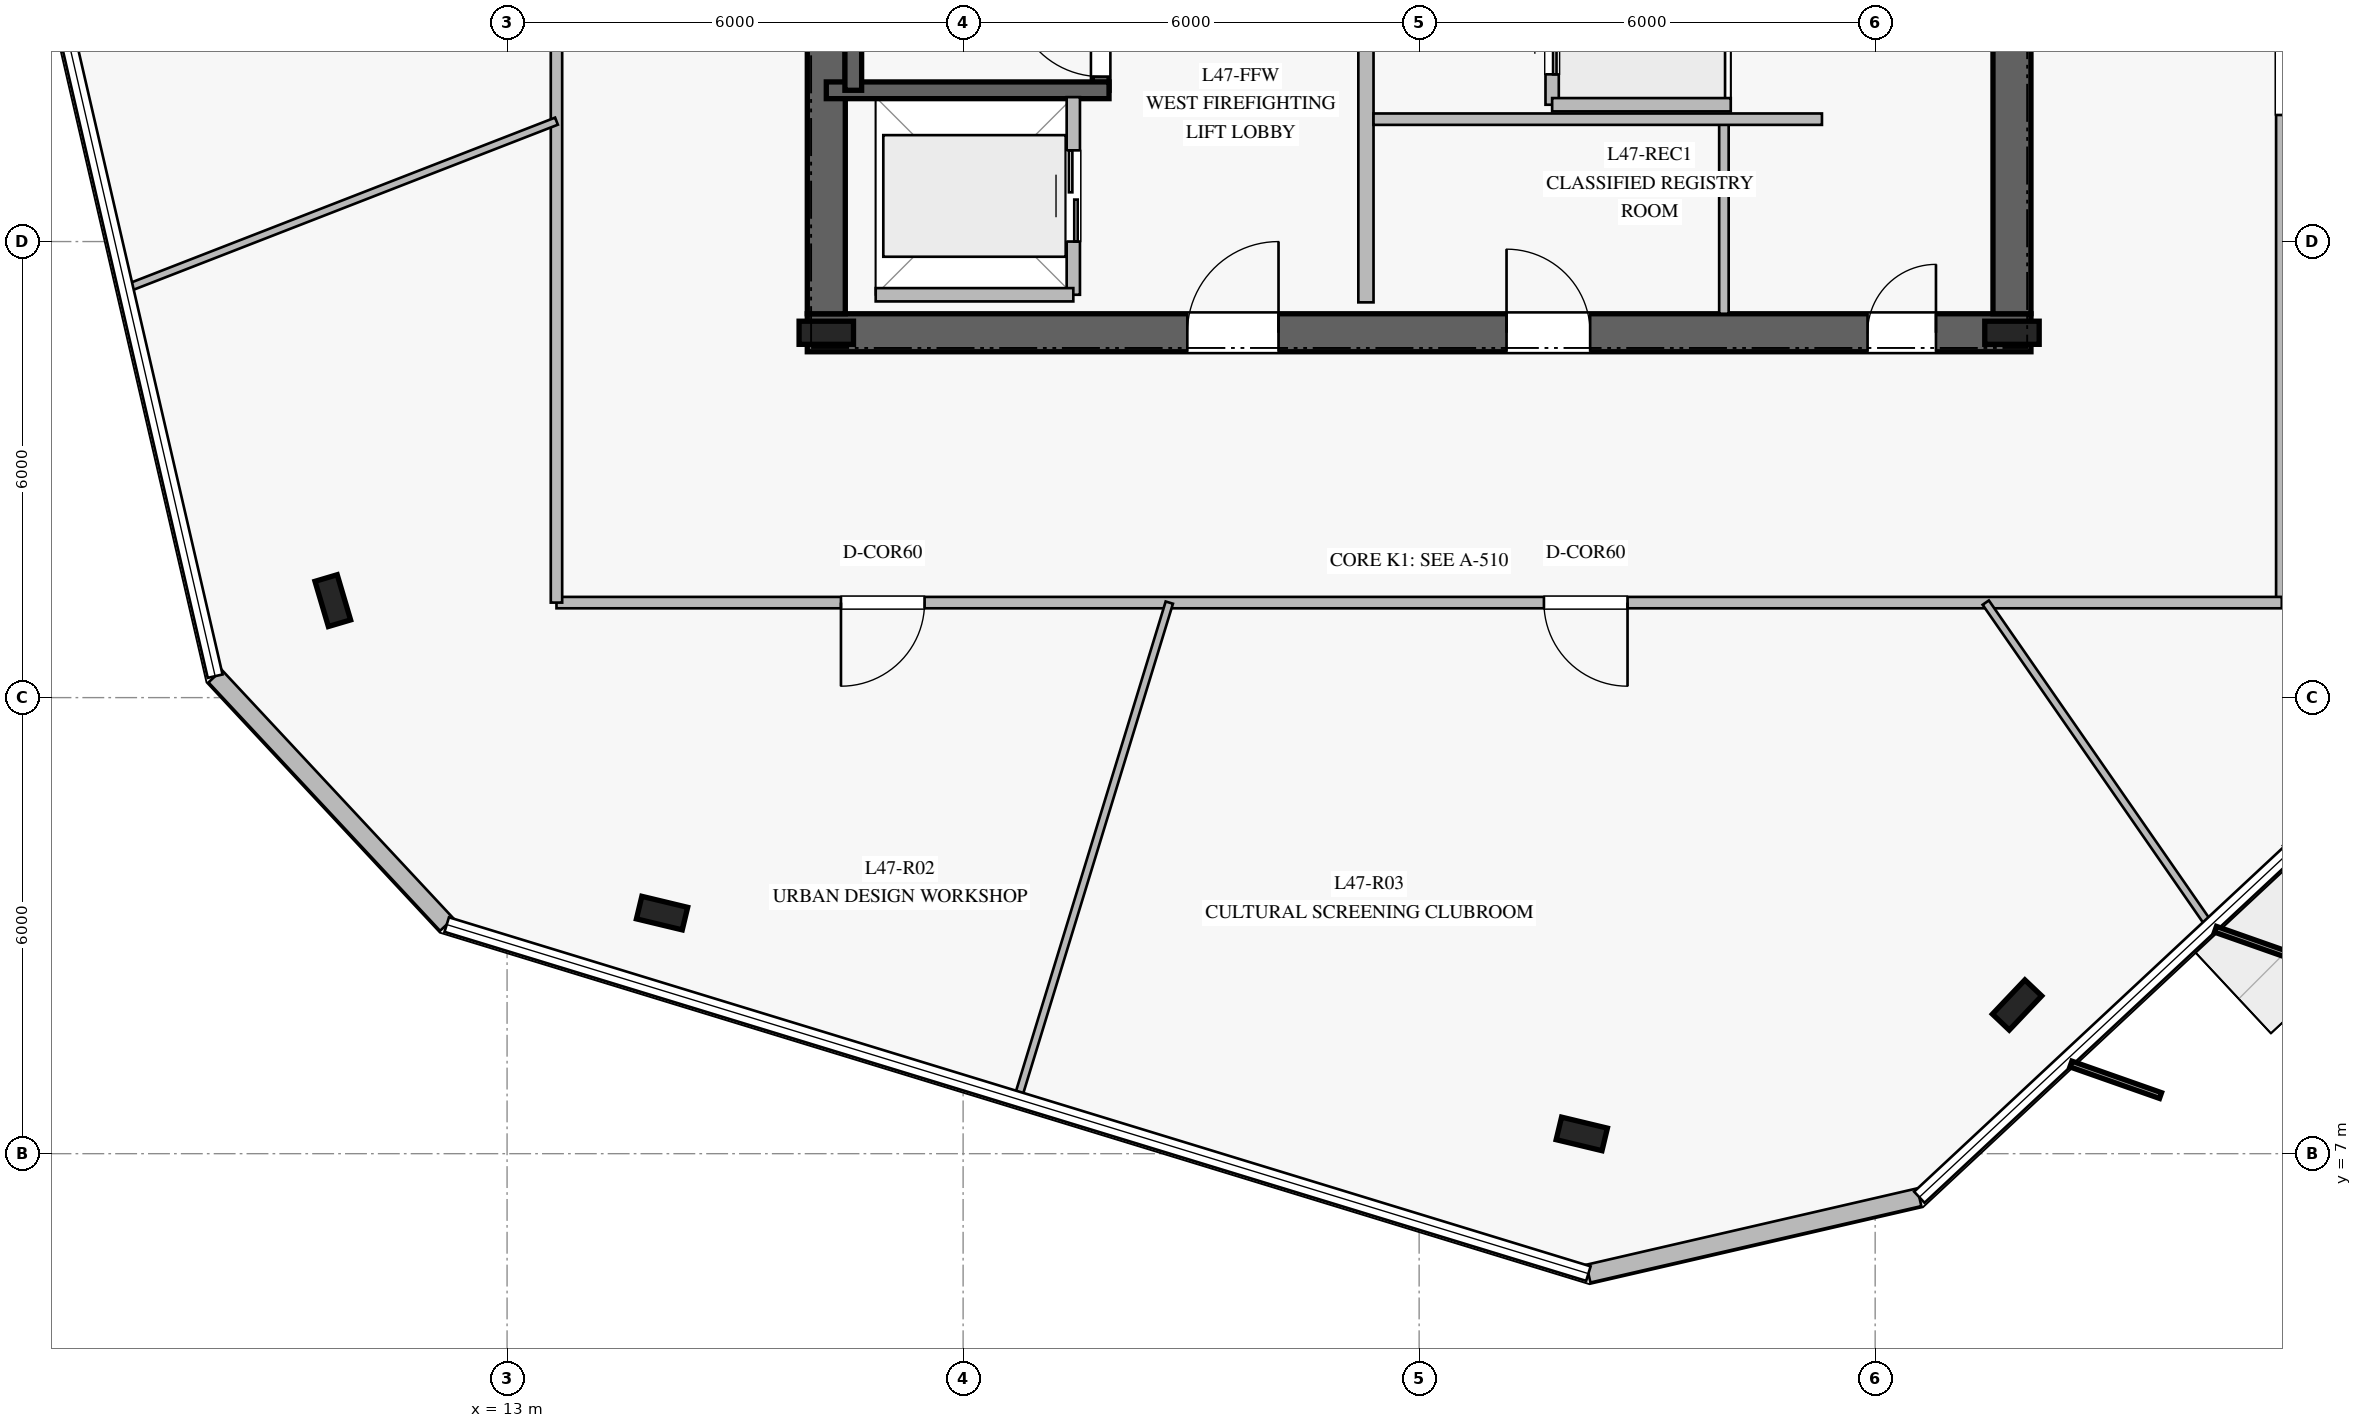
"""IFC4 building model, lengths in metres.
Left out: names, types, materials, properties, quantities, classifications, styles, units other than length and angle.
Written with IfcOpenShell. Run it as: python <this file> out.ifc"""

import sys

from ifc_helpers import new_model, si_unit, direction, frame, frame_2d, origin, origin_2d, place, context, subcontext, project, spatial, rectangle, i_section, extrude, element, fill, save


model = new_model("IFC4")
c1 = context("Model", 3, precision=1e-05, world=origin(), true_north=direction((0.0, 1.0)))
c2 = subcontext(c1, "Body", "Model", "MODEL_VIEW")
j1 = project(units=[si_unit("LENGTHUNIT", "METRE"), si_unit("PLANEANGLEUNIT", "RADIAN")], contexts=[c1])
p1 = place(None, origin())
s1 = spatial("IfcSite", under=j1, at=p1, CompositionType="ELEMENT")
p2 = place(p1, origin())
s2 = spatial("IfcBuilding", under=s1, at=p2, CompositionType="ELEMENT")
p3 = place(p2, frame((0.0, 0.0, 196.8)))
s3 = spatial("IfcBuildingStorey", under=s2, at=p3, CompositionType="ELEMENT", Elevation=196.8)
p4 = place(p3, frame((16.95, 17.8, 0.0), z_axis=(0.0, 0.0, 1.0), x_axis=(1.0, 0.0, 0.0)))
e1 = element("IfcWall", 1, at=p4, inside=s3, PredefinedType="SHEAR", context=c2, shape_type="SweptSolid", body=[
    extrude(rectangle(XDim=16.1, YDim=0.5, at=frame_2d((8.05, 0.0))), origin(), (0.0, 0.0, 1.0), 3.78),
])
p5 = place(p4, frame((5.0, 0.0, 0.0)))
e2 = element("IfcOpeningElement", 2, at=p5, cuts=e1, PredefinedType="OPENING", context=c2, shape_type="SweptSolid", body=[
    extrude(rectangle(XDim=1.2, YDim=2.25, at=frame_2d((0.6, 1.125))), frame((0.0, 0.26, 0.0), z_axis=(0.0, -1.0, 0.0), x_axis=(1.0, 0.0, 0.0)), (0.0, 0.0, 1.0), 0.52),
])
p6 = place(p4, frame((13.95, 0.0, 0.0)))
e3 = element("IfcOpeningElement", 3, at=p6, cuts=e1, PredefinedType="OPENING", context=c2, shape_type="SweptSolid", body=[
    extrude(rectangle(XDim=0.9, YDim=2.1, at=frame_2d((0.45, 1.05))), frame((0.0, 0.26, 0.0), z_axis=(0.0, -1.0, 0.0), x_axis=(1.0, 0.0, 0.0)), (0.0, 0.0, 1.0), 0.52),
])
p7 = place(p4, frame((9.2, 0.0, 0.0)))
e4 = element("IfcOpeningElement", 4, at=p7, cuts=e1, PredefinedType="OPENING", context=c2, shape_type="SweptSolid", body=[
    extrude(rectangle(XDim=1.1, YDim=2.2, at=frame_2d((0.55, 1.1))), frame((0.0, 0.26, 0.0), z_axis=(0.0, -1.0, 0.0), x_axis=(1.0, 0.0, 0.0)), (0.0, 0.0, 1.0), 0.52),
])
p8 = place(p3, frame((17.2, 31.95, 0.0), z_axis=(0.0, 0.0, 1.0), x_axis=(0.0, -1.0, 0.0)))
e5 = element("IfcWall", 5, at=p8, inside=s3, PredefinedType="SHEAR", context=c2, shape_type="SweptSolid", body=[
    extrude(rectangle(XDim=13.9, YDim=0.5, at=frame_2d((6.95, 0.0))), origin(), (0.0, 0.0, 1.0), 3.78),
])
p9 = place(p8, frame((2.1, 0.0, 0.0)))
e6 = element("IfcOpeningElement", 6, at=p9, cuts=e5, PredefinedType="OPENING", context=c2, shape_type="SweptSolid", body=[
    extrude(rectangle(XDim=1.5, YDim=2.2, at=frame_2d((0.75, 1.1))), frame((0.0, 0.26, 0.0), z_axis=(0.0, -1.0, 0.0), x_axis=(1.0, 0.0, 0.0)), (0.0, 0.0, 1.0), 0.52),
])
p10 = place(p3, frame((32.8, 18.05, 0.0), z_axis=(0.0, 0.0, 1.0), x_axis=(0.0, 1.0, 0.0)))
e7 = element("IfcWall", 7, at=p10, inside=s3, PredefinedType="SHEAR", context=c2, shape_type="SweptSolid", body=[
    extrude(rectangle(XDim=13.9, YDim=0.5, at=frame_2d((6.95, 0.0))), origin(), (0.0, 0.0, 1.0), 3.78),
])
for number, where, z_axis, x_axis in (
    (8, (17.2, 17.8, 0.0), (0.0, 0.0, 1.0), (1.0, 0.0, 0.0)),
    (9, (32.8, 17.8, 0.0), (0.0, 0.0, 1.0), (1.0, 0.0, 0.0)),
):
    element("IfcColumn", number, at=place(p3, frame(where, z_axis=z_axis, x_axis=x_axis)), inside=s3, PredefinedType="COLUMN", context=c2, shape_type="SweptSolid", body=[
        extrude(i_section(OverallWidth=0.304, OverallDepth=0.716, WebThickness=0.021, FlangeThickness=0.04, at=origin_2d()), origin(), (0.0, 0.0, 1.0), 4.0),
    ])
p11 = place(p3, frame((20.81, 20.99, 0.0), z_axis=(0.0, 0.0, 1.0), x_axis=(0.0, 1.0, 0.0)))
e10 = element("IfcWall", 10, at=p11, inside=s3, PredefinedType="SOLIDWALL", context=c2, shape_type="SweptSolid", body=[
    extrude(rectangle(XDim=7.22, YDim=0.22, at=frame_2d((3.61, 0.0))), origin(), (0.0, 0.0, 1.0), 3.78),
])
p12 = place(p11, frame((0.18, 0.0, 0.0)))
e11 = element("IfcOpeningElement", 11, at=p12, cuts=e10, PredefinedType="OPENING", context=c2, shape_type="SweptSolid", body=[
    extrude(rectangle(XDim=1.15, YDim=2.2, at=frame_2d((0.575, 1.1))), frame((0.0, 0.12, 0.0), z_axis=(0.0, -1.0, 0.0), x_axis=(1.0, 0.0, 0.0)), (0.0, 0.0, 1.0), 0.24),
])
p13 = place(p3, frame((17.2, 20.99, 0.0), z_axis=(0.0, 0.0, 1.0), x_axis=(1.0, 0.0, 0.0)))
e12 = element("IfcWall", 12, at=p13, inside=s3, PredefinedType="SOLIDWALL", context=c2, shape_type="SweptSolid", body=[
    extrude(rectangle(XDim=3.72, YDim=0.22, at=frame_2d((1.86, 0.0))), origin(), (0.0, 0.0, 1.0), 3.78),
])
p14 = place(p3, frame((17.555, 28.21, 0.0), z_axis=(0.0, 0.0, 1.0), x_axis=(0.0, -1.0, 0.0)))
e13 = element("IfcWall", 13, at=p14, inside=s3, PredefinedType="SOLIDWALL", context=c2, shape_type="SweptSolid", body=[
    extrude(rectangle(XDim=7.22, YDim=0.22, at=frame_2d((3.61, 0.0))), origin(), (0.0, 0.0, 1.0), 3.78),
])
for number, where, z_axis, x_axis in (
    (14, (10.707, 14.276, 0.0), (0.0, 0.0, 1.0), (-0.284, 0.959, 0.0)),
    (15, (15.039, 10.165, 0.0), (0.0, 0.0, 1.0), (-0.972, 0.233, 0.0)),
    (16, (27.14, 7.26, 0.0), (0.0, 0.0, 1.0), (-0.972, 0.233, 0.0)),
    (17, (32.867, 8.956, 0.0), (0.0, 0.0, 1.0), (0.688, 0.725, 0.0)),
):
    element("IfcColumn", number, at=place(p3, frame(where, z_axis=z_axis, x_axis=x_axis)), inside=s3, PredefinedType="COLUMN", context=c2, shape_type="SweptSolid", body=[
        extrude(i_section(OverallWidth=0.305, OverallDepth=0.62, WebThickness=0.021, FlangeThickness=0.04, at=origin_2d()), origin(), (0.0, 0.0, 1.0), 4.0),
    ])
p15 = place(p3, frame((9.159, 13.282, 0.0), z_axis=(0.0, 0.0, 1.0), x_axis=(0.681950226265, -0.73139858415, 0.0)))
e18 = element("IfcWall", 18, at=p15, inside=s3, PredefinedType="STANDARD", context=c2, shape_type="SweptSolid", body=[
    extrude(rectangle(XDim=4.468, YDim=0.24, at=frame_2d((2.234, 0.0))), origin(), (0.0, 0.0, 1.0), 3.78),
])
p16 = place(p3, frame((27.227, 5.422, 0.0), z_axis=(0.0, 0.0, 1.0), x_axis=(0.974385670371, 0.224883448427, 0.0)))
e19 = element("IfcWall", 19, at=p16, inside=s3, PredefinedType="STANDARD", context=c2, shape_type="SweptSolid", body=[
    extrude(rectangle(XDim=4.469, YDim=0.24, at=frame_2d((2.234, 0.0))), origin(), (0.0, 0.0, 1.0), 3.78),
])
p17 = place(p3, frame((24.3, 18.2, 0.0), z_axis=(0.0, 0.0, 1.0), x_axis=(0.0, 1.0, 0.0)))
e20 = element("IfcWall", 20, at=p17, inside=s3, PredefinedType="PARTITIONING", context=c2, shape_type="SweptSolid", body=[
    extrude(rectangle(XDim=5.15, YDim=0.2, at=frame_2d((2.575, 0.0))), origin(), (0.0, 0.0, 1.0), 3.78),
])
p18 = place(p3, frame((29.01, 18.05, 0.0), z_axis=(0.0, 0.0, 1.0), x_axis=(0.0, 1.0, 0.0)))
e21 = element("IfcWall", 21, at=p18, inside=s3, PredefinedType="PARTITIONING", context=c2, shape_type="SweptSolid", body=[
    extrude(rectangle(XDim=2.5, YDim=0.125, at=frame_2d((1.25, 0.0))), origin(), (0.0, 0.0, 1.0), 3.78),
])
p19 = place(p3, frame((24.4, 20.61, 0.0), z_axis=(0.0, 0.0, 1.0), x_axis=(1.0, 0.0, 0.0)))
e22 = element("IfcWall", 22, at=p19, inside=s3, PredefinedType="PARTITIONING", context=c2, shape_type="SweptSolid", body=[
    extrude(rectangle(XDim=5.9, YDim=0.15, at=frame_2d((2.95, 0.0))), origin(), (0.0, 0.0, 1.0), 3.78),
])
p20 = place(p3, frame((26.75, 20.8, 0.0), z_axis=(0.0, 0.0, 1.0), x_axis=(0.0, 1.0, 0.0)))
e23 = element("IfcWall", 23, at=p20, inside=s3, PredefinedType="PARTITIONING", context=c2, shape_type="SweptSolid", body=[
    extrude(rectangle(XDim=1.9, YDim=0.175, at=frame_2d((0.95, 0.0))), origin(), (0.0, 0.0, 1.0), 3.78),
])
p21 = place(p20, frame((0.4, 0.0, 0.0)))
e24 = element("IfcOpeningElement", 24, at=p21, cuts=e23, PredefinedType="OPENING", context=c2, shape_type="SweptSolid", body=[
    extrude(rectangle(XDim=1.1, YDim=2.2, at=frame_2d((0.55, 1.1))), frame((0.0, 0.098, 0.0), z_axis=(0.0, -1.0, 0.0), x_axis=(1.0, 0.0, 0.0)), (0.0, 0.0, 1.0), 0.195),
])
p22 = place(p3, frame((26.75, 20.8, 0.0), z_axis=(0.0, 0.0, 1.0), x_axis=(1.0, 0.0, 0.0)))
e25 = element("IfcWall", 25, at=p22, inside=s3, PredefinedType="PARTITIONING", context=c2, shape_type="SweptSolid", body=[
    extrude(rectangle(XDim=2.35, YDim=0.175, at=frame_2d((1.175, 0.0))), origin(), (0.0, 0.0, 1.0), 3.78),
])
p23 = place(p3, frame((20.45, 18.3, 0.0), z_axis=(0.0, 0.0, 1.0), x_axis=(0.0, 1.0, 0.0)))
e26 = element("IfcWall", 26, at=p23, inside=s3, PredefinedType="PARTITIONING", context=c2, shape_type="SweptSolid", body=[
    extrude(rectangle(XDim=2.6, YDim=0.175, at=frame_2d((1.3, 0.0))), origin(), (0.0, 0.0, 1.0), 3.78),
])
p24 = place(p23, frame((0.7, 0.0, 0.0)))
e27 = element("IfcOpeningElement", 27, at=p24, cuts=e26, PredefinedType="OPENING", context=c2, shape_type="SweptSolid", body=[
    extrude(rectangle(XDim=1.2, YDim=2.2, at=frame_2d((0.6, 1.1))), frame((0.0, 0.098, 0.0), z_axis=(0.0, -1.0, 0.0), x_axis=(1.0, 0.0, 0.0)), (0.0, 0.0, 1.0), 0.195),
])
p25 = place(p3, frame((17.85, 18.3, 0.0), z_axis=(0.0, 0.0, 1.0), x_axis=(1.0, 0.0, 0.0)))
e28 = element("IfcWall", 28, at=p25, inside=s3, PredefinedType="PARTITIONING", context=c2, shape_type="SweptSolid", body=[
    extrude(rectangle(XDim=2.6, YDim=0.175, at=frame_2d((1.3, 0.0))), origin(), (0.0, 0.0, 1.0), 3.78),
])
p26 = place(p3, frame((36.35, 35.75, 0.0), z_axis=(0.0, 0.0, 1.0), x_axis=(0.0, -1.0, 0.0)))
e29 = element("IfcWall", 29, at=p26, inside=s3, PredefinedType="PARTITIONING", context=c2, shape_type="SweptSolid", body=[
    extrude(rectangle(XDim=21.5, YDim=0.15, at=frame_2d((10.75, 0.0))), origin(), (0.0, 0.0, 1.0), 3.05),
])
p27 = place(p26, frame((13.985, 0.0, 0.0)))
e30 = element("IfcOpeningElement", 30, at=p27, cuts=e29, PredefinedType="OPENING", context=c2, shape_type="SweptSolid", body=[
    extrude(rectangle(XDim=1.1, YDim=2.2, at=frame_2d((0.55, 1.1))), frame((0.0, 0.085, 0.0), z_axis=(0.0, -1.0, 0.0), x_axis=(1.0, 0.0, 0.0)), (0.0, 0.0, 1.0), 0.17),
])
p28 = place(p26, frame((3.69, 0.0, 0.0)))
e31 = element("IfcOpeningElement", 31, at=p28, cuts=e29, PredefinedType="OPENING", context=c2, shape_type="SweptSolid", body=[
    extrude(rectangle(XDim=1.1, YDim=2.2, at=frame_2d((0.55, 1.1))), frame((0.0, 0.085, 0.0), z_axis=(0.0, -1.0, 0.0), x_axis=(1.0, 0.0, 0.0)), (0.0, 0.0, 1.0), 0.17),
])
p29 = place(p3, frame((36.35, 14.25, 0.0), z_axis=(0.0, 0.0, 1.0), x_axis=(-1.0, 0.0, 0.0)))
e32 = element("IfcWall", 32, at=p29, inside=s3, PredefinedType="PARTITIONING", context=c2, shape_type="SweptSolid", body=[
    extrude(rectangle(XDim=22.7, YDim=0.15, at=frame_2d((11.35, 0.0))), origin(), (0.0, 0.0, 1.0), 3.05),
])
p30 = place(p29, frame((17.857, 0.0, 0.0)))
e33 = element("IfcOpeningElement", 33, at=p30, cuts=e32, PredefinedType="OPENING", context=c2, shape_type="SweptSolid", body=[
    extrude(rectangle(XDim=1.1, YDim=2.2, at=frame_2d((0.55, 1.1))), frame((0.0, 0.085, 0.0), z_axis=(0.0, -1.0, 0.0), x_axis=(1.0, 0.0, 0.0)), (0.0, 0.0, 1.0), 0.17),
])
p31 = place(p29, frame((8.608, 0.0, 0.0)))
e34 = element("IfcOpeningElement", 34, at=p31, cuts=e32, PredefinedType="OPENING", context=c2, shape_type="SweptSolid", body=[
    extrude(rectangle(XDim=1.1, YDim=2.2, at=frame_2d((0.55, 1.1))), frame((0.0, 0.085, 0.0), z_axis=(0.0, -1.0, 0.0), x_axis=(1.0, 0.0, 0.0)), (0.0, 0.0, 1.0), 0.17),
])
p32 = place(p3, frame((13.65, 14.25, 0.0), z_axis=(0.0, 0.0, 1.0), x_axis=(0.0, 1.0, 0.0)))
e35 = element("IfcWall", 35, at=p32, inside=s3, PredefinedType="PARTITIONING", context=c2, shape_type="SweptSolid", body=[
    extrude(rectangle(XDim=21.5, YDim=0.15, at=frame_2d((10.75, 0.0))), origin(), (0.0, 0.0, 1.0), 3.05),
])
p33 = place(p32, frame((11.853, 0.0, 0.0)))
e36 = element("IfcOpeningElement", 36, at=p33, cuts=e35, PredefinedType="OPENING", context=c2, shape_type="SweptSolid", body=[
    extrude(rectangle(XDim=1.1, YDim=2.2, at=frame_2d((0.55, 1.1))), frame((0.0, 0.085, 0.0), z_axis=(0.0, -1.0, 0.0), x_axis=(1.0, 0.0, 0.0)), (0.0, 0.0, 1.0), 0.17),
])
p34 = place(p3, frame((13.65, 20.584, 0.0), z_axis=(0.0, 0.0, 1.0), x_axis=(-0.931968408731, -0.362539494577, 0.0)))
e37 = element("IfcWall", 37, at=p34, inside=s3, PredefinedType="MOVABLE", context=c2, shape_type="SweptSolid", body=[
    extrude(rectangle(XDim=6.065, YDim=0.1, at=frame_2d((3.033, 0.0))), origin(), (0.0, 0.0, 1.0), 3.18),
])
p35 = place(p3, frame((21.713, 14.25, 0.0), z_axis=(0.0, 0.0, 1.0), x_axis=(-0.292340513473, -0.956314291529, 0.0)))
e38 = element("IfcWall", 38, at=p35, inside=s3, PredefinedType="MOVABLE", context=c2, shape_type="SweptSolid", body=[
    extrude(rectangle(XDim=6.814, YDim=0.1, at=frame_2d((3.407, 0.0))), origin(), (0.0, 0.0, 1.0), 3.18),
])
p36 = place(p3, frame((32.455, 14.25, 0.0), z_axis=(0.0, 0.0, 1.0), x_axis=(0.569886082616, -0.821723708336, 0.0)))
e39 = element("IfcWall", 39, at=p36, inside=s3, PredefinedType="MOVABLE", context=c2, shape_type="SweptSolid", body=[
    extrude(rectangle(XDim=5.162, YDim=0.1, at=frame_2d((2.581, 0.0))), origin(), (0.0, 0.0, 1.0), 3.05),
])
p37 = place(p12, origin())
e40 = element("IfcDoor", 40, at=p37, inside=s3, OperationType="SINGLE_SWING_RIGHT", PredefinedType="DOOR", context=c2, shape_type="SweptSolid", body=[
    extrude(rectangle(XDim=1.15, YDim=2.2, at=frame_2d((0.575, 1.1))), frame((0.0, 0.025, 0.0), z_axis=(0.0, -1.0, 0.0), x_axis=(1.0, 0.0, 0.0)), (0.0, 0.0, 1.0), 0.05),
])
fill(e11, e40)
p38 = place(p5, origin())
e41 = element("IfcDoor", 41, at=p38, inside=s3, OperationType="SINGLE_SWING_RIGHT", PredefinedType="DOOR", context=c2, shape_type="SweptSolid", body=[
    extrude(rectangle(XDim=1.2, YDim=2.25, at=frame_2d((0.6, 1.125))), frame((0.0, 0.025, 0.0), z_axis=(0.0, -1.0, 0.0), x_axis=(1.0, 0.0, 0.0)), (0.0, 0.0, 1.0), 0.05),
])
fill(e2, e41)
p39 = place(p6, origin())
e42 = element("IfcDoor", 42, at=p39, inside=s3, OperationType="SINGLE_SWING_RIGHT", PredefinedType="DOOR", context=c2, shape_type="SweptSolid", body=[
    extrude(rectangle(XDim=0.9, YDim=2.1, at=frame_2d((0.45, 1.05))), frame((0.0, 0.025, 0.0), z_axis=(0.0, -1.0, 0.0), x_axis=(1.0, 0.0, 0.0)), (0.0, 0.0, 1.0), 0.05),
])
fill(e3, e42)
p40 = place(p7, origin())
e43 = element("IfcDoor", 43, at=p40, inside=s3, OperationType="SINGLE_SWING_LEFT", PredefinedType="DOOR", context=c2, shape_type="SweptSolid", body=[
    extrude(rectangle(XDim=1.1, YDim=2.2, at=frame_2d((0.55, 1.1))), frame((0.0, 0.025, 0.0), z_axis=(0.0, -1.0, 0.0), x_axis=(1.0, 0.0, 0.0)), (0.0, 0.0, 1.0), 0.05),
])
fill(e4, e43)
p41 = place(p21, origin())
e44 = element("IfcDoor", 44, at=p41, inside=s3, OperationType="DOUBLE_DOOR_SLIDING", PredefinedType="DOOR", context=c2, shape_type="SweptSolid", body=[
    extrude(rectangle(XDim=1.1, YDim=2.2, at=frame_2d((0.55, 1.1))), frame((0.0, 0.025, 0.0), z_axis=(0.0, -1.0, 0.0), x_axis=(1.0, 0.0, 0.0)), (0.0, 0.0, 1.0), 0.05),
])
fill(e24, e44)
p42 = place(p24, origin())
e45 = element("IfcDoor", 45, at=p42, inside=s3, OperationType="DOUBLE_DOOR_SLIDING", PredefinedType="DOOR", context=c2, shape_type="SweptSolid", body=[
    extrude(rectangle(XDim=1.2, YDim=2.2, at=frame_2d((0.6, 1.1))), frame((0.0, 0.025, 0.0), z_axis=(0.0, -1.0, 0.0), x_axis=(1.0, 0.0, 0.0)), (0.0, 0.0, 1.0), 0.05),
])
fill(e27, e45)
p43 = place(p30, origin())
e46 = element("IfcDoor", 46, at=p43, inside=s3, OperationType="SINGLE_SWING_RIGHT", PredefinedType="DOOR", context=c2, shape_type="SweptSolid", body=[
    extrude(rectangle(XDim=1.1, YDim=2.2, at=frame_2d((0.55, 1.1))), frame((0.0, 0.025, 0.0), z_axis=(0.0, -1.0, 0.0), x_axis=(1.0, 0.0, 0.0)), (0.0, 0.0, 1.0), 0.05),
])
fill(e33, e46)
p44 = place(p31, origin())
e47 = element("IfcDoor", 47, at=p44, inside=s3, OperationType="SINGLE_SWING_LEFT", PredefinedType="DOOR", context=c2, shape_type="SweptSolid", body=[
    extrude(rectangle(XDim=1.1, YDim=2.2, at=frame_2d((0.55, 1.1))), frame((0.0, 0.025, 0.0), z_axis=(0.0, -1.0, 0.0), x_axis=(1.0, 0.0, 0.0)), (0.0, 0.0, 1.0), 0.05),
])
fill(e34, e47)
p45 = place(p27, origin())
e48 = element("IfcDoor", 48, at=p45, inside=s3, OperationType="SINGLE_SWING_RIGHT", PredefinedType="DOOR", context=c2, shape_type="SweptSolid", body=[
    extrude(rectangle(XDim=1.1, YDim=2.2, at=frame_2d((0.55, 1.1))), frame((0.0, 0.025, 0.0), z_axis=(0.0, -1.0, 0.0), x_axis=(1.0, 0.0, 0.0)), (0.0, 0.0, 1.0), 0.05),
])
fill(e30, e48)
save(model, sys.argv[1])
